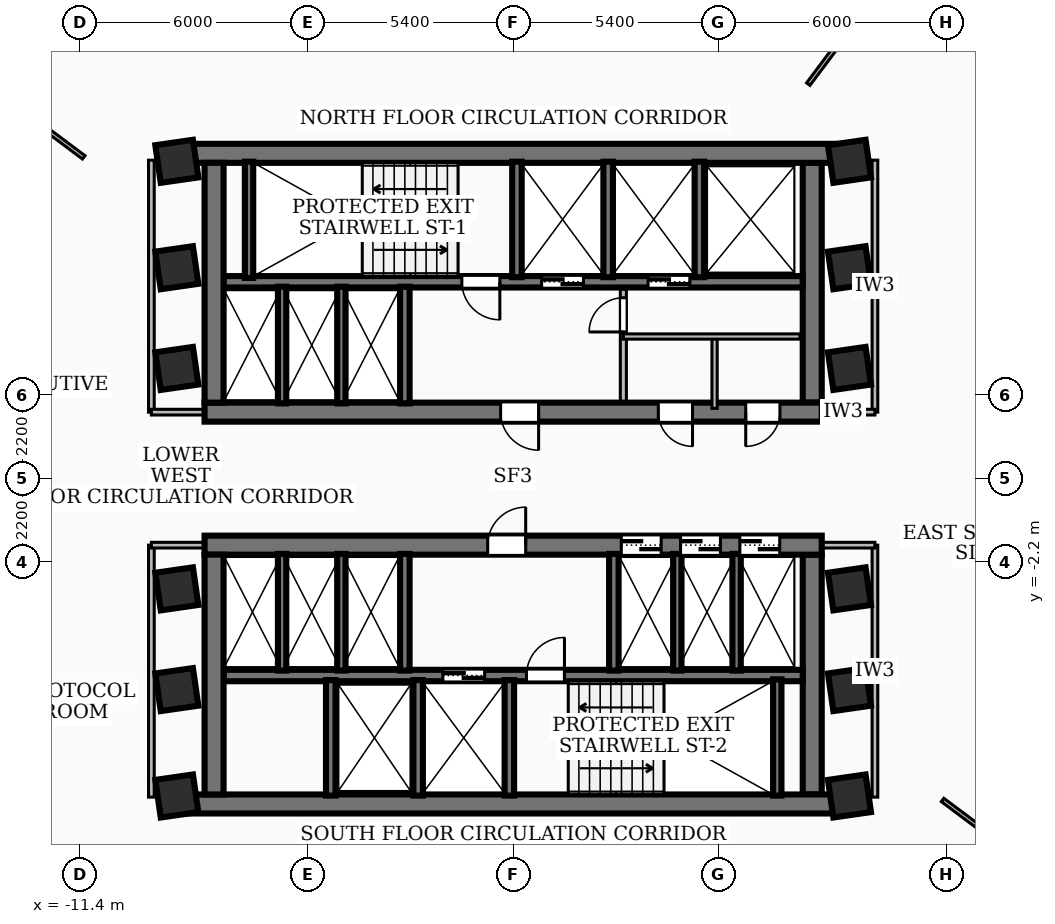
"""IFC4 building model, lengths in metres.
Left out: names, types, materials, properties, quantities, classifications, styles, units other than length and angle.
Written with IfcOpenShell. Run it as: python <this file> out.ifc"""

import sys

from ifc_helpers import new_model, si_unit, direction, frame, frame_2d, origin, origin_2d, place, context, subcontext, project, spatial, rectangle, extrude, element, fill, save


model = new_model("IFC4")
c1 = context("Model", 3, precision=1e-05, world=origin(), true_north=direction((0.0, 1.0)))
c2 = subcontext(c1, "Body", "Model", "MODEL_VIEW")
j1 = project(units=[si_unit("LENGTHUNIT", "METRE"), si_unit("PLANEANGLEUNIT", "RADIAN")], contexts=[c1])
p1 = place(None, origin())
s1 = spatial("IfcSite", under=j1, at=p1, CompositionType="ELEMENT")
p2 = place(p1, origin())
s2 = spatial("IfcBuilding", under=s1, at=p2, CompositionType="ELEMENT")
p3 = place(p2, frame((0.0, 0.0, 85.68)))
s3 = spatial("IfcBuildingStorey", under=s2, at=p3, CompositionType="ELEMENT", Elevation=85.68)
p4 = place(p3, frame((-8.78, 8.56, 0.0), z_axis=(0.0, 0.0, 1.0), x_axis=(1.0, 0.0, 0.0)))
e1 = element("IfcWall", 1, at=p4, inside=s3, PredefinedType="SHEAR", context=c2, shape_type="SweptSolid", body=[
    extrude(rectangle(XDim=17.56, YDim=0.5, at=frame_2d((8.78, 0.0))), origin(), (0.0, 0.0, 1.0), 3.34),
])
p5 = place(p3, frame((8.12, 1.75, 0.0), z_axis=(0.0, 0.0, 1.0), x_axis=(-1.0, 0.0, 0.0)))
e2 = element("IfcWall", 2, at=p5, inside=s3, PredefinedType="SHEAR", context=c2, shape_type="SweptSolid", body=[
    extrude(rectangle(XDim=16.24, YDim=0.5, at=frame_2d((8.12, 0.0))), origin(), (0.0, 0.0, 1.0), 3.34),
])
p6 = place(p5, frame((7.45, 0.0, 0.0)))
e3 = element("IfcOpeningElement", 3, at=p6, cuts=e2, PredefinedType="OPENING", context=c2, shape_type="SweptSolid", body=[
    extrude(rectangle(XDim=1.0, YDim=2.1, at=frame_2d((0.5, 1.05))), frame((0.0, 0.26, 0.0), z_axis=(0.0, -1.0, 0.0), x_axis=(1.0, 0.0, 0.0)), (0.0, 0.0, 1.0), 0.52),
])
p7 = place(p5, frame((3.4, 0.0, 0.0)))
e4 = element("IfcOpeningElement", 4, at=p7, cuts=e2, PredefinedType="OPENING", context=c2, shape_type="SweptSolid", body=[
    extrude(rectangle(XDim=0.9, YDim=2.06, at=frame_2d((0.45, 1.03))), frame((0.0, 0.26, 0.0), z_axis=(0.0, -1.0, 0.0), x_axis=(1.0, 0.0, 0.0)), (0.0, 0.0, 1.0), 0.52),
])
p8 = place(p5, frame((1.1, 0.0, 0.0)))
e5 = element("IfcOpeningElement", 5, at=p8, cuts=e2, PredefinedType="OPENING", context=c2, shape_type="SweptSolid", body=[
    extrude(rectangle(XDim=0.9, YDim=2.06, at=frame_2d((0.45, 1.03))), frame((0.0, 0.26, 0.0), z_axis=(0.0, -1.0, 0.0), x_axis=(1.0, 0.0, 0.0)), (0.0, 0.0, 1.0), 0.52),
])
for number, where, z_axis, x_axis in (
    (6, (-7.87, 2.0, 0.0), (0.0, 0.0, 1.0), (0.0, 1.0, 0.0)),
    (7, (7.87, 8.31, 0.0), (0.0, 0.0, 1.0), (0.0, -1.0, 0.0)),
):
    element("IfcWall", number, at=place(p3, frame(where, z_axis=z_axis, x_axis=x_axis)), inside=s3, PredefinedType="SHEAR", context=c2, shape_type="SweptSolid", body=[
        extrude(rectangle(XDim=6.31, YDim=0.5, at=frame_2d((3.155, 0.0))), origin(), (0.0, 0.0, 1.0), 3.34),
    ])
p9 = place(p3, frame((7.62, 5.18, 0.0), z_axis=(0.0, 0.0, 1.0), x_axis=(-1.0, 0.0, 0.0)))
e8 = element("IfcWall", 8, at=p9, inside=s3, PredefinedType="SOLIDWALL", context=c2, shape_type="SweptSolid", body=[
    extrude(rectangle(XDim=15.24, YDim=0.3, at=frame_2d((7.62, 0.0))), origin(), (0.0, 0.0, 1.0), 3.34),
])
p10 = place(p9, frame((5.77, 0.0, 0.0)))
e9 = element("IfcOpeningElement", 9, at=p10, cuts=e8, PredefinedType="OPENING", context=c2, shape_type="SweptSolid", body=[
    extrude(rectangle(XDim=1.1, YDim=2.15, at=frame_2d((0.55, 1.075))), frame((0.0, 0.16, 0.0), z_axis=(0.0, -1.0, 0.0), x_axis=(1.0, 0.0, 0.0)), (0.0, 0.0, 1.0), 0.32),
])
p11 = place(p9, frame((2.97, 0.0, 0.0)))
e10 = element("IfcOpeningElement", 10, at=p11, cuts=e8, PredefinedType="OPENING", context=c2, shape_type="SweptSolid", body=[
    extrude(rectangle(XDim=1.1, YDim=2.15, at=frame_2d((0.55, 1.075))), frame((0.0, 0.16, 0.0), z_axis=(0.0, -1.0, 0.0), x_axis=(1.0, 0.0, 0.0)), (0.0, 0.0, 1.0), 0.32),
])
p12 = place(p9, frame((7.97, 0.0, 0.0)))
e11 = element("IfcOpeningElement", 11, at=p12, cuts=e8, PredefinedType="OPENING", context=c2, shape_type="SweptSolid", body=[
    extrude(rectangle(XDim=1.0, YDim=2.1, at=frame_2d((0.5, 1.05))), frame((0.0, 0.16, 0.0), z_axis=(0.0, -1.0, 0.0), x_axis=(1.0, 0.0, 0.0)), (0.0, 0.0, 1.0), 0.32),
])
p13 = place(p3, frame((8.78, -8.56, 0.0), z_axis=(0.0, 0.0, 1.0), x_axis=(-1.0, 0.0, 0.0)))
e12 = element("IfcWall", 12, at=p13, inside=s3, PredefinedType="SHEAR", context=c2, shape_type="SweptSolid", body=[
    extrude(rectangle(XDim=17.56, YDim=0.5, at=frame_2d((8.78, 0.0))), origin(), (0.0, 0.0, 1.0), 3.34),
])
p14 = place(p3, frame((-8.12, -1.75, 0.0), z_axis=(0.0, 0.0, 1.0), x_axis=(1.0, 0.0, 0.0)))
e13 = element("IfcWall", 13, at=p14, inside=s3, PredefinedType="SHEAR", context=c2, shape_type="SweptSolid", body=[
    extrude(rectangle(XDim=16.24, YDim=0.5, at=frame_2d((8.12, 0.0))), origin(), (0.0, 0.0, 1.0), 3.34),
])
p15 = place(p14, frame((7.45, 0.0, 0.0)))
e14 = element("IfcOpeningElement", 14, at=p15, cuts=e13, PredefinedType="OPENING", context=c2, shape_type="SweptSolid", body=[
    extrude(rectangle(XDim=1.0, YDim=2.1, at=frame_2d((0.5, 1.05))), frame((0.0, 0.26, 0.0), z_axis=(0.0, -1.0, 0.0), x_axis=(1.0, 0.0, 0.0)), (0.0, 0.0, 1.0), 0.52),
])
p16 = place(p14, frame((10.965, 0.0, 0.0)))
e15 = element("IfcOpeningElement", 15, at=p16, cuts=e13, PredefinedType="OPENING", context=c2, shape_type="SweptSolid", body=[
    extrude(rectangle(XDim=1.05, YDim=2.15, at=frame_2d((0.525, 1.075))), frame((0.0, 0.26, 0.0), z_axis=(0.0, -1.0, 0.0), x_axis=(1.0, 0.0, 0.0)), (0.0, 0.0, 1.0), 0.52),
])
p17 = place(p14, frame((12.525, 0.0, 0.0)))
e16 = element("IfcOpeningElement", 16, at=p17, cuts=e13, PredefinedType="OPENING", context=c2, shape_type="SweptSolid", body=[
    extrude(rectangle(XDim=1.05, YDim=2.15, at=frame_2d((0.525, 1.075))), frame((0.0, 0.26, 0.0), z_axis=(0.0, -1.0, 0.0), x_axis=(1.0, 0.0, 0.0)), (0.0, 0.0, 1.0), 0.52),
])
p18 = place(p14, frame((14.085, 0.0, 0.0)))
e17 = element("IfcOpeningElement", 17, at=p18, cuts=e13, PredefinedType="OPENING", context=c2, shape_type="SweptSolid", body=[
    extrude(rectangle(XDim=1.05, YDim=2.15, at=frame_2d((0.525, 1.075))), frame((0.0, 0.26, 0.0), z_axis=(0.0, -1.0, 0.0), x_axis=(1.0, 0.0, 0.0)), (0.0, 0.0, 1.0), 0.52),
])
for number, where, z_axis, x_axis in (
    (18, (-7.87, -8.31, 0.0), (0.0, 0.0, 1.0), (0.0, 1.0, 0.0)),
    (19, (7.87, -2.0, 0.0), (0.0, 0.0, 1.0), (0.0, -1.0, 0.0)),
):
    element("IfcWall", number, at=place(p3, frame(where, z_axis=z_axis, x_axis=x_axis)), inside=s3, PredefinedType="SHEAR", context=c2, shape_type="SweptSolid", body=[
        extrude(rectangle(XDim=6.31, YDim=0.5, at=frame_2d((3.155, 0.0))), origin(), (0.0, 0.0, 1.0), 3.34),
    ])
p19 = place(p3, frame((-7.62, -5.18, 0.0), z_axis=(0.0, 0.0, 1.0), x_axis=(1.0, 0.0, 0.0)))
e20 = element("IfcWall", 20, at=p19, inside=s3, PredefinedType="SOLIDWALL", context=c2, shape_type="SweptSolid", body=[
    extrude(rectangle(XDim=15.24, YDim=0.3, at=frame_2d((7.62, 0.0))), origin(), (0.0, 0.0, 1.0), 3.34),
])
p20 = place(p19, frame((5.77, 0.0, 0.0)))
e21 = element("IfcOpeningElement", 21, at=p20, cuts=e20, PredefinedType="OPENING", context=c2, shape_type="SweptSolid", body=[
    extrude(rectangle(XDim=1.1, YDim=2.15, at=frame_2d((0.55, 1.075))), frame((0.0, 0.16, 0.0), z_axis=(0.0, -1.0, 0.0), x_axis=(1.0, 0.0, 0.0)), (0.0, 0.0, 1.0), 0.32),
])
p21 = place(p19, frame((7.97, 0.0, 0.0)))
e22 = element("IfcOpeningElement", 22, at=p21, cuts=e20, PredefinedType="OPENING", context=c2, shape_type="SweptSolid", body=[
    extrude(rectangle(XDim=1.0, YDim=2.1, at=frame_2d((0.5, 1.05))), frame((0.0, 0.16, 0.0), z_axis=(0.0, -1.0, 0.0), x_axis=(1.0, 0.0, 0.0)), (0.0, 0.0, 1.0), 0.32),
])
for number, where, z_axis, x_axis in (
    (23, (-6.95, 5.28, 0.0), (0.0, 0.0, 1.0), (0.0, 1.0, 0.0)),
    (24, (6.95, -8.34, 0.0), (0.0, 0.0, 1.0), (0.0, 1.0, 0.0)),
):
    element("IfcWall", number, at=place(p3, frame(where, z_axis=z_axis, x_axis=x_axis)), inside=s3, PredefinedType="SOLIDWALL", context=c2, shape_type="SweptSolid", body=[
        extrude(rectangle(XDim=3.06, YDim=0.22, at=frame_2d((1.53, 0.0))), origin(), (0.0, 0.0, 1.0), 3.34),
    ])
for number, where, z_axis, x_axis in (
    (25, (0.1, 5.3, 0.0), (0.0, 0.0, 1.0), (0.0, 1.0, 0.0)),
    (26, (2.5, 5.3, 0.0), (0.0, 0.0, 1.0), (0.0, 1.0, 0.0)),
    (27, (4.9, 5.3, 0.0), (0.0, 0.0, 1.0), (0.0, 1.0, 0.0)),
):
    element("IfcWall", number, at=place(p3, frame(where, z_axis=z_axis, x_axis=x_axis)), inside=s3, PredefinedType="SOLIDWALL", context=c2, shape_type="SweptSolid", body=[
        extrude(rectangle(XDim=3.04, YDim=0.25, at=frame_2d((1.52, 0.0))), origin(), (0.0, 0.0, 1.0), 3.34),
    ])
p22 = place(p3, frame((-2.85, 1.98, 0.0), z_axis=(0.0, 0.0, 1.0), x_axis=(0.0, 1.0, 0.0)))
e28 = element("IfcWall", 28, at=p22, inside=s3, PredefinedType="SOLIDWALL", context=c2, shape_type="SweptSolid", body=[
    extrude(rectangle(XDim=3.07, YDim=0.25, at=frame_2d((1.535, 0.0))), origin(), (0.0, 0.0, 1.0), 3.34),
])
for number, where, z_axis, x_axis in (
    (29, (-0.1, -8.34, 0.0), (0.0, 0.0, 1.0), (0.0, 1.0, 0.0)),
    (30, (-2.5, -8.34, 0.0), (0.0, 0.0, 1.0), (0.0, 1.0, 0.0)),
    (31, (-4.8, -8.34, 0.0), (0.0, 0.0, 1.0), (0.0, 1.0, 0.0)),
):
    element("IfcWall", number, at=place(p3, frame(where, z_axis=z_axis, x_axis=x_axis)), inside=s3, PredefinedType="SOLIDWALL", context=c2, shape_type="SweptSolid", body=[
        extrude(rectangle(XDim=3.04, YDim=0.25, at=frame_2d((1.52, 0.0))), origin(), (0.0, 0.0, 1.0), 3.34),
    ])
for number, where, z_axis, x_axis in (
    (32, (-2.85, -5.05, 0.0), (0.0, 0.0, 1.0), (0.0, 1.0, 0.0)),
    (33, (2.65, -5.05, 0.0), (0.0, 0.0, 1.0), (0.0, 1.0, 0.0)),
):
    element("IfcWall", number, at=place(p3, frame(where, z_axis=z_axis, x_axis=x_axis)), inside=s3, PredefinedType="SOLIDWALL", context=c2, shape_type="SweptSolid", body=[
        extrude(rectangle(XDim=3.07, YDim=0.25, at=frame_2d((1.535, 0.0))), origin(), (0.0, 0.0, 1.0), 3.34),
    ])
for number, where, z_axis, x_axis in (
    (34, (-6.08, 1.98, 0.0), (0.0, 0.0, 1.0), (0.0, 1.0, 0.0)),
    (35, (-4.52, 1.98, 0.0), (0.0, 0.0, 1.0), (0.0, 1.0, 0.0)),
    (36, (4.32, -5.05, 0.0), (0.0, 0.0, 1.0), (0.0, 1.0, 0.0)),
    (37, (5.88, -5.05, 0.0), (0.0, 0.0, 1.0), (0.0, 1.0, 0.0)),
    (38, (-6.08, -5.05, 0.0), (0.0, 0.0, 1.0), (0.0, 1.0, 0.0)),
    (39, (-4.52, -5.05, 0.0), (0.0, 0.0, 1.0), (0.0, 1.0, 0.0)),
):
    element("IfcWall", number, at=place(p3, frame(where, z_axis=z_axis, x_axis=x_axis)), inside=s3, PredefinedType="SOLIDWALL", context=c2, shape_type="SweptSolid", body=[
        extrude(rectangle(XDim=3.07, YDim=0.22, at=frame_2d((1.535, 0.0))), origin(), (0.0, 0.0, 1.0), 3.34),
    ])
for number, where, z_axis, x_axis in (
    (40, (-8.85, -5.55, 0.0), (0.0, 0.0, 1.0), (0.99, 0.143, 0.0)),
    (41, (-8.85, -2.9, 0.0), (0.0, 0.0, 1.0), (0.99, 0.143, 0.0)),
    (42, (-8.85, 2.9, 0.0), (0.0, 0.0, 1.0), (0.99, 0.143, 0.0)),
    (43, (-8.85, 5.55, 0.0), (0.0, 0.0, 1.0), (0.99, 0.143, 0.0)),
    (44, (8.85, -5.55, 0.0), (0.0, 0.0, 1.0), (0.99, 0.143, 0.0)),
    (45, (8.85, -2.9, 0.0), (0.0, 0.0, 1.0), (0.99, 0.143, 0.0)),
    (46, (8.85, 2.9, 0.0), (0.0, 0.0, 1.0), (0.99, 0.143, 0.0)),
    (47, (8.85, 5.55, 0.0), (0.0, 0.0, 1.0), (0.99, 0.143, 0.0)),
    (48, (-8.85, 8.35, 0.0), (0.0, 0.0, 1.0), (0.99, 0.143, 0.0)),
    (49, (8.85, -8.35, 0.0), (0.0, 0.0, 1.0), (0.99, 0.143, 0.0)),
    (50, (8.85, 8.35, 0.0), (0.0, 0.0, 1.0), (0.99, 0.143, 0.0)),
    (51, (-8.85, -8.35, 0.0), (0.0, 0.0, 1.0), (0.99, 0.143, 0.0)),
):
    element("IfcColumn", number, at=place(p3, frame(where, z_axis=z_axis, x_axis=x_axis)), inside=s3, PredefinedType="COLUMN", context=c2, shape_type="SweptSolid", body=[
        extrude(rectangle(XDim=1.0, YDim=1.0, at=origin_2d()), origin(), (0.0, 0.0, 1.0), 3.6),
    ])
p23 = place(p3, frame((2.9, 2.04, 0.0), z_axis=(0.0, 0.0, 1.0), x_axis=(0.0, 1.0, 0.0)))
e52 = element("IfcWall", 52, at=p23, inside=s3, PredefinedType="PARTITIONING", context=c2, shape_type="SweptSolid", body=[
    extrude(rectangle(XDim=2.94, YDim=0.16, at=frame_2d((1.47, 0.0))), origin(), (0.0, 0.0, 1.0), 2.405),
])
p24 = place(p23, frame((1.82, 0.0, 0.0)))
e53 = element("IfcOpeningElement", 53, at=p24, cuts=e52, PredefinedType="OPENING", context=c2, shape_type="SweptSolid", body=[
    extrude(rectangle(XDim=0.9, YDim=2.06, at=frame_2d((0.45, 1.03))), frame((0.0, 0.09, 0.0), z_axis=(0.0, -1.0, 0.0), x_axis=(1.0, 0.0, 0.0)), (0.0, 0.0, 1.0), 0.18),
])
p25 = place(p3, frame((2.9, 3.74, 0.0), z_axis=(0.0, 0.0, 1.0), x_axis=(1.0, 0.0, 0.0)))
e54 = element("IfcWall", 54, at=p25, inside=s3, PredefinedType="PARTITIONING", context=c2, shape_type="SweptSolid", body=[
    extrude(rectangle(XDim=4.65, YDim=0.138, at=frame_2d((2.325, 0.0))), origin(), (0.0, 0.0, 1.0), 3.34),
])
p26 = place(p3, frame((5.3, 1.85, 0.0), z_axis=(0.0, 0.0, 1.0), x_axis=(0.0, 1.0, 0.0)))
e55 = element("IfcWall", 55, at=p26, inside=s3, PredefinedType="PARTITIONING", context=c2, shape_type="SweptSolid", body=[
    extrude(rectangle(XDim=1.89, YDim=0.138, at=frame_2d((0.945, 0.0))), origin(), (0.0, 0.0, 1.0), 2.405),
])
p27 = place(p3, frame((-9.52, 1.75, 0.0), z_axis=(0.0, 0.0, 1.0), x_axis=(0.0, 1.0, 0.0)))
e56 = element("IfcWall", 56, at=p27, inside=s3, PredefinedType="PARTITIONING", context=c2, shape_type="SweptSolid", body=[
    extrude(rectangle(XDim=6.63, YDim=0.15, at=frame_2d((3.315, 0.0))), origin(), (0.0, 0.0, 1.0), 2.486),
])
p28 = place(p3, frame((-7.85, 1.75, 0.0), z_axis=(0.0, 0.0, 1.0), x_axis=(-1.0, 0.0, 0.0)))
e57 = element("IfcWall", 57, at=p28, inside=s3, PredefinedType="PARTITIONING", context=c2, shape_type="SweptSolid", body=[
    extrude(rectangle(XDim=1.67, YDim=0.15, at=frame_2d((0.835, 0.0))), origin(), (0.0, 0.0, 1.0), 2.405),
])
p29 = place(p3, frame((-9.52, -8.38, 0.0), z_axis=(0.0, 0.0, 1.0), x_axis=(0.0, 1.0, 0.0)))
e58 = element("IfcWall", 58, at=p29, inside=s3, PredefinedType="PARTITIONING", context=c2, shape_type="SweptSolid", body=[
    extrude(rectangle(XDim=6.63, YDim=0.15, at=frame_2d((3.315, 0.0))), origin(), (0.0, 0.0, 1.0), 2.486),
])
p30 = place(p3, frame((-7.85, -1.75, 0.0), z_axis=(0.0, 0.0, 1.0), x_axis=(-1.0, 0.0, 0.0)))
e59 = element("IfcWall", 59, at=p30, inside=s3, PredefinedType="PARTITIONING", context=c2, shape_type="SweptSolid", body=[
    extrude(rectangle(XDim=1.67, YDim=0.15, at=frame_2d((0.835, 0.0))), origin(), (0.0, 0.0, 1.0), 2.405),
])
p31 = place(p3, frame((9.52, 1.75, 0.0), z_axis=(0.0, 0.0, 1.0), x_axis=(0.0, 1.0, 0.0)))
e60 = element("IfcWall", 60, at=p31, inside=s3, PredefinedType="PARTITIONING", context=c2, shape_type="SweptSolid", body=[
    extrude(rectangle(XDim=6.63, YDim=0.15, at=frame_2d((3.315, 0.0))), origin(), (0.0, 0.0, 1.0), 2.486),
])
p32 = place(p3, frame((7.85, 1.75, 0.0), z_axis=(0.0, 0.0, 1.0), x_axis=(1.0, 0.0, 0.0)))
e61 = element("IfcWall", 61, at=p32, inside=s3, PredefinedType="PARTITIONING", context=c2, shape_type="SweptSolid", body=[
    extrude(rectangle(XDim=1.67, YDim=0.15, at=frame_2d((0.835, 0.0))), origin(), (0.0, 0.0, 1.0), 2.405),
])
p33 = place(p3, frame((9.52, -8.38, 0.0), z_axis=(0.0, 0.0, 1.0), x_axis=(0.0, 1.0, 0.0)))
e62 = element("IfcWall", 62, at=p33, inside=s3, PredefinedType="PARTITIONING", context=c2, shape_type="SweptSolid", body=[
    extrude(rectangle(XDim=6.63, YDim=0.15, at=frame_2d((3.315, 0.0))), origin(), (0.0, 0.0, 1.0), 2.486),
])
p34 = place(p3, frame((7.85, -1.75, 0.0), z_axis=(0.0, 0.0, 1.0), x_axis=(1.0, 0.0, 0.0)))
e63 = element("IfcWall", 63, at=p34, inside=s3, PredefinedType="PARTITIONING", context=c2, shape_type="SweptSolid", body=[
    extrude(rectangle(XDim=1.67, YDim=0.15, at=frame_2d((0.835, 0.0))), origin(), (0.0, 0.0, 1.0), 2.405),
])
p35 = place(p3, frame((7.766, 10.38, 0.0), z_axis=(0.0, 0.0, 1.0), x_axis=(0.598966195252, 0.800774310867, 0.0)))
e64 = element("IfcWall", 64, at=p35, inside=s3, PredefinedType="PARTITIONING", context=c2, shape_type="SweptSolid", body=[
    extrude(rectangle(XDim=6.691, YDim=0.11, at=frame_2d((3.346, 0.0))), origin(), (0.0, 0.0, 1.0), 3.34),
])
for number, where, z_axis, x_axis in (
    (65, (-11.3, 8.454, 0.0), (0.0, 0.0, 1.0), (-0.801, 0.599, 0.0)),
    (66, (11.3, -8.454, 0.0), (0.0, 0.0, 1.0), (0.801, -0.599, 0.0)),
):
    element("IfcWall", number, at=place(p3, frame(where, z_axis=z_axis, x_axis=x_axis)), inside=s3, PredefinedType="PARTITIONING", context=c2, shape_type="SweptSolid", body=[
        extrude(rectangle(XDim=5.542, YDim=0.11, at=frame_2d((2.771, 0.0))), origin(), (0.0, 0.0, 1.0), 3.34),
    ])
p36 = place(p6, origin())
e67 = element("IfcDoor", 67, at=p36, inside=s3, OperationType="SINGLE_SWING_LEFT", PredefinedType="DOOR", context=c2, shape_type="SweptSolid", body=[
    extrude(rectangle(XDim=1.0, YDim=2.1, at=frame_2d((0.5, 1.05))), frame((0.0, 0.025, 0.0), z_axis=(0.0, -1.0, 0.0), x_axis=(1.0, 0.0, 0.0)), (0.0, 0.0, 1.0), 0.05),
])
fill(e3, e67)
p37 = place(p15, origin())
e68 = element("IfcDoor", 68, at=p37, inside=s3, OperationType="SINGLE_SWING_RIGHT", PredefinedType="DOOR", context=c2, shape_type="SweptSolid", body=[
    extrude(rectangle(XDim=1.0, YDim=2.1, at=frame_2d((0.5, 1.05))), frame((0.0, 0.025, 0.0), z_axis=(0.0, -1.0, 0.0), x_axis=(1.0, 0.0, 0.0)), (0.0, 0.0, 1.0), 0.05),
])
fill(e14, e68)
p38 = place(p10, origin())
e69 = element("IfcDoor", 69, at=p38, inside=s3, OperationType="DOUBLE_DOOR_SLIDING", PredefinedType="DOOR", context=c2, shape_type="SweptSolid", body=[
    extrude(rectangle(XDim=1.1, YDim=2.15, at=frame_2d((0.55, 1.075))), frame((0.0, 0.025, 0.0), z_axis=(0.0, -1.0, 0.0), x_axis=(1.0, 0.0, 0.0)), (0.0, 0.0, 1.0), 0.05),
])
fill(e9, e69)
p39 = place(p11, origin())
e70 = element("IfcDoor", 70, at=p39, inside=s3, OperationType="DOUBLE_DOOR_SLIDING", PredefinedType="DOOR", context=c2, shape_type="SweptSolid", body=[
    extrude(rectangle(XDim=1.1, YDim=2.15, at=frame_2d((0.55, 1.075))), frame((0.0, 0.025, 0.0), z_axis=(0.0, -1.0, 0.0), x_axis=(1.0, 0.0, 0.0)), (0.0, 0.0, 1.0), 0.05),
])
fill(e10, e70)
p40 = place(p12, origin())
e71 = element("IfcDoor", 71, at=p40, inside=s3, OperationType="SINGLE_SWING_LEFT", PredefinedType="DOOR", context=c2, shape_type="SweptSolid", body=[
    extrude(rectangle(XDim=1.0, YDim=2.1, at=frame_2d((0.5, 1.05))), frame((0.0, 0.025, 0.0), z_axis=(0.0, -1.0, 0.0), x_axis=(1.0, 0.0, 0.0)), (0.0, 0.0, 1.0), 0.05),
])
fill(e11, e71)
p41 = place(p20, origin())
e72 = element("IfcDoor", 72, at=p41, inside=s3, OperationType="DOUBLE_DOOR_SLIDING", PredefinedType="DOOR", context=c2, shape_type="SweptSolid", body=[
    extrude(rectangle(XDim=1.1, YDim=2.15, at=frame_2d((0.55, 1.075))), frame((0.0, 0.025, 0.0), z_axis=(0.0, -1.0, 0.0), x_axis=(1.0, 0.0, 0.0)), (0.0, 0.0, 1.0), 0.05),
])
fill(e21, e72)
p42 = place(p21, origin())
e73 = element("IfcDoor", 73, at=p42, inside=s3, OperationType="SINGLE_SWING_RIGHT", PredefinedType="DOOR", context=c2, shape_type="SweptSolid", body=[
    extrude(rectangle(XDim=1.0, YDim=2.1, at=frame_2d((0.5, 1.05))), frame((0.0, 0.025, 0.0), z_axis=(0.0, -1.0, 0.0), x_axis=(1.0, 0.0, 0.0)), (0.0, 0.0, 1.0), 0.05),
])
fill(e22, e73)
p43 = place(p16, origin())
e74 = element("IfcDoor", 74, at=p43, inside=s3, OperationType="DOUBLE_DOOR_SLIDING", PredefinedType="DOOR", context=c2, shape_type="SweptSolid", body=[
    extrude(rectangle(XDim=1.05, YDim=2.15, at=frame_2d((0.525, 1.075))), frame((0.0, 0.025, 0.0), z_axis=(0.0, -1.0, 0.0), x_axis=(1.0, 0.0, 0.0)), (0.0, 0.0, 1.0), 0.05),
])
fill(e15, e74)
p44 = place(p17, origin())
e75 = element("IfcDoor", 75, at=p44, inside=s3, OperationType="DOUBLE_DOOR_SLIDING", PredefinedType="DOOR", context=c2, shape_type="SweptSolid", body=[
    extrude(rectangle(XDim=1.05, YDim=2.15, at=frame_2d((0.525, 1.075))), frame((0.0, 0.025, 0.0), z_axis=(0.0, -1.0, 0.0), x_axis=(1.0, 0.0, 0.0)), (0.0, 0.0, 1.0), 0.05),
])
fill(e16, e75)
p45 = place(p18, origin())
e76 = element("IfcDoor", 76, at=p45, inside=s3, OperationType="DOUBLE_DOOR_SLIDING", PredefinedType="DOOR", context=c2, shape_type="SweptSolid", body=[
    extrude(rectangle(XDim=1.05, YDim=2.15, at=frame_2d((0.525, 1.075))), frame((0.0, 0.025, 0.0), z_axis=(0.0, -1.0, 0.0), x_axis=(1.0, 0.0, 0.0)), (0.0, 0.0, 1.0), 0.05),
])
fill(e17, e76)
p46 = place(p7, origin())
e77 = element("IfcDoor", 77, at=p46, inside=s3, OperationType="SINGLE_SWING_LEFT", PredefinedType="DOOR", context=c2, shape_type="SweptSolid", body=[
    extrude(rectangle(XDim=0.9, YDim=2.06, at=frame_2d((0.45, 1.03))), frame((0.0, 0.025, 0.0), z_axis=(0.0, -1.0, 0.0), x_axis=(1.0, 0.0, 0.0)), (0.0, 0.0, 1.0), 0.05),
])
fill(e4, e77)
p47 = place(p8, origin())
e78 = element("IfcDoor", 78, at=p47, inside=s3, OperationType="SINGLE_SWING_RIGHT", PredefinedType="DOOR", context=c2, shape_type="SweptSolid", body=[
    extrude(rectangle(XDim=0.9, YDim=2.06, at=frame_2d((0.45, 1.03))), frame((0.0, 0.025, 0.0), z_axis=(0.0, -1.0, 0.0), x_axis=(1.0, 0.0, 0.0)), (0.0, 0.0, 1.0), 0.05),
])
fill(e5, e78)
p48 = place(p24, origin())
e79 = element("IfcDoor", 79, at=p48, inside=s3, OperationType="SINGLE_SWING_LEFT", PredefinedType="DOOR", context=c2, shape_type="SweptSolid", body=[
    extrude(rectangle(XDim=0.9, YDim=2.06, at=frame_2d((0.45, 1.03))), frame((0.0, 0.025, 0.0), z_axis=(0.0, -1.0, 0.0), x_axis=(1.0, 0.0, 0.0)), (0.0, 0.0, 1.0), 0.05),
])
fill(e53, e79)
save(model, sys.argv[1])
